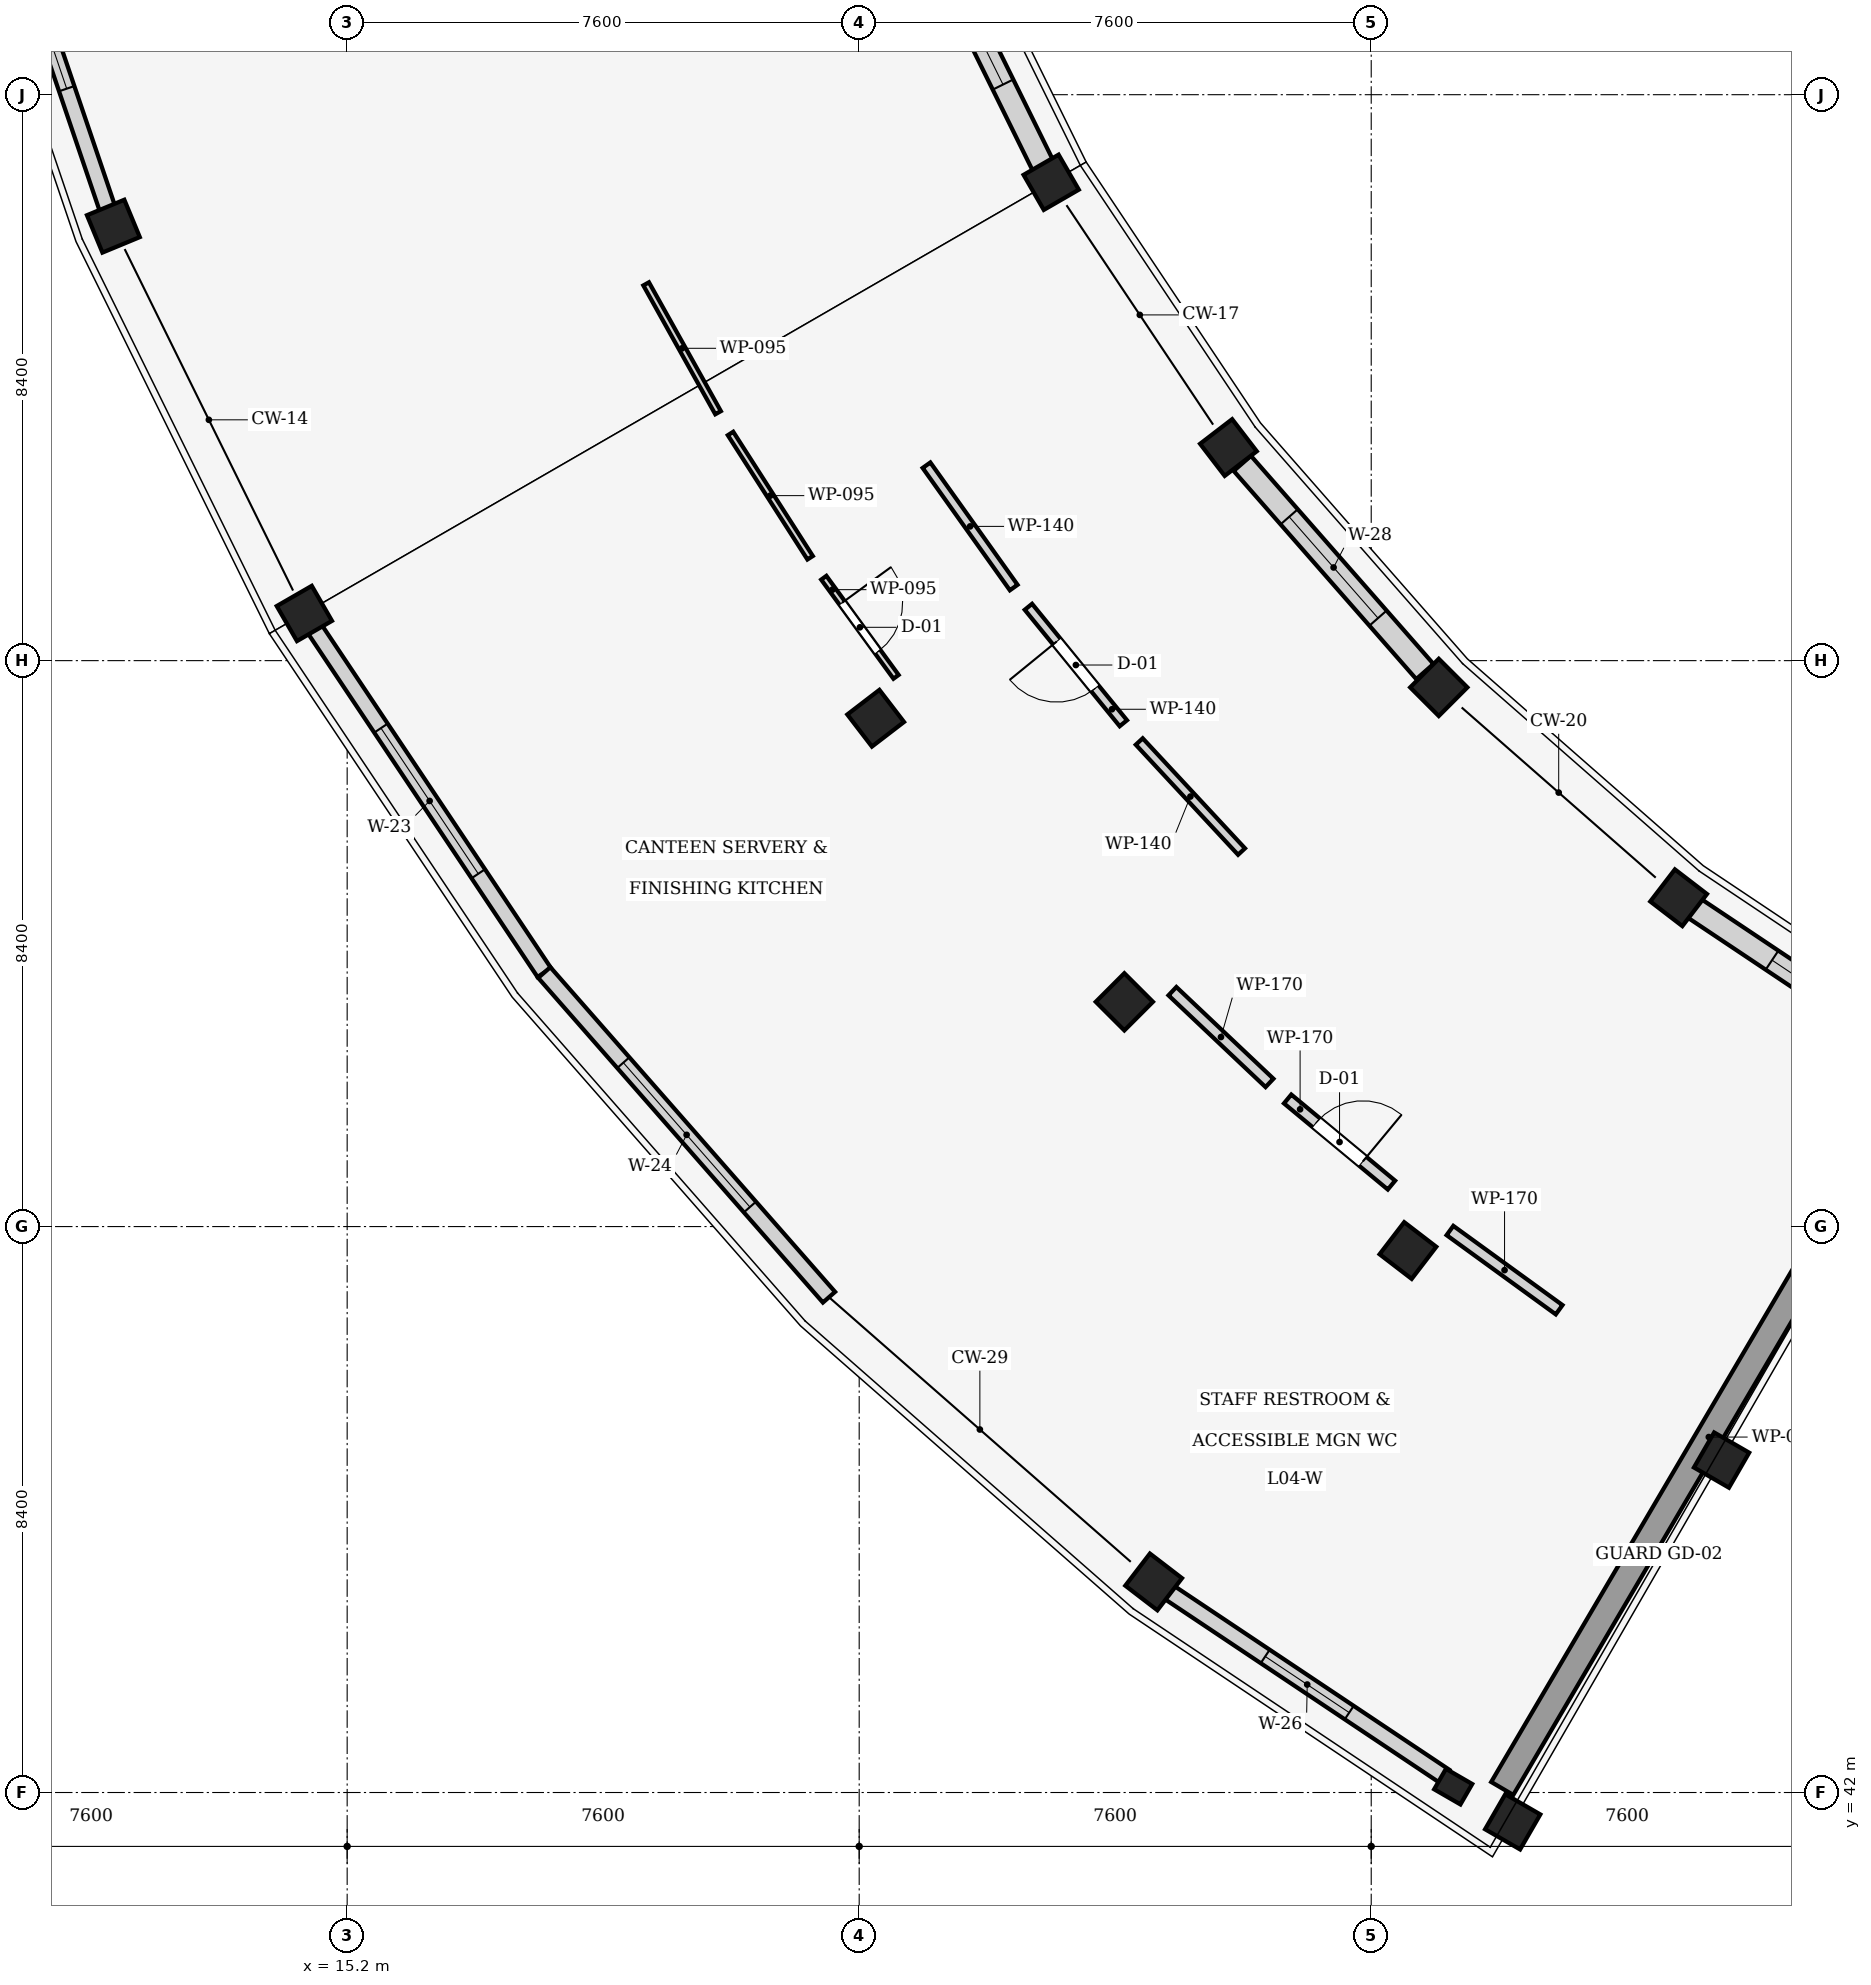
"""IFC4 building model, lengths in metres.
Left out: names, types, materials, properties, quantities, classifications, styles, units other than length and angle.
Written with IfcOpenShell. Run it as: python <this file> out.ifc"""

import sys

from ifc_helpers import new_model, si_unit, direction, frame, frame_2d, origin, origin_2d, place, context, subcontext, project, spatial, rectangle, extrude, element, fill, save


model = new_model("IFC4")
c1 = context("Model", 3, precision=1e-05, world=origin(), true_north=direction((0.0, 1.0)))
c2 = subcontext(c1, "Body", "Model", "MODEL_VIEW")
j1 = project(units=[si_unit("LENGTHUNIT", "METRE"), si_unit("PLANEANGLEUNIT", "RADIAN")], contexts=[c1])
p1 = place(None, origin())
s1 = spatial("IfcSite", under=j1, at=p1, CompositionType="ELEMENT")
p2 = place(p1, origin())
s2 = spatial("IfcBuilding", under=s1, at=p2, CompositionType="ELEMENT")
p3 = place(p2, frame((0.0, 0.0, 17.25)))
s3 = spatial("IfcBuildingStorey", under=s2, at=p3, CompositionType="ELEMENT", Elevation=17.25)
for number, where, z_axis, x_axis in (
    (1, (11.73, 65.249, 0.0), (0.0, 0.0, 1.0), (-0.924, -0.383, 0.0)),
    (2, (25.65, 65.9, 0.0), (0.0, 0.0, 1.0), (-0.866, -0.5, 0.0)),
    (3, (14.565, 59.5, 0.0), (0.0, 0.0, 1.0), (-0.866, -0.5, 0.0)),
    (4, (28.281, 61.963, 0.0), (0.0, 0.0, 1.0), (-0.793, -0.609, 0.0)),
    (5, (23.044, 57.945, 0.0), (0.0, 0.0, 1.0), (-0.793, -0.609, 0.0)),
    (6, (31.403, 58.403, 0.0), (0.0, 0.0, 1.0), (-0.707, -0.707, 0.0)),
    (7, (26.736, 53.736, 0.0), (0.0, 0.0, 1.0), (-0.707, -0.707, 0.0)),
    (8, (34.963, 55.281, 0.0), (0.0, 0.0, 1.0), (-0.609, -0.793, 0.0)),
    (9, (30.945, 50.044, 0.0), (0.0, 0.0, 1.0), (-0.609, -0.793, 0.0)),
    (10, (27.171, 45.126, 0.0), (0.0, 0.0, 1.0), (-0.609, -0.793, 0.0)),
    (11, (35.6, 46.934, 0.0), (0.0, 0.0, 1.0), (-0.5, -0.866, 0.0)),
    (12, (32.5, 41.565, 0.0), (0.0, 0.0, 1.0), (-0.5, -0.866, 0.0)),
):
    element("IfcColumn", number, at=place(p3, frame(where, z_axis=z_axis, x_axis=x_axis)), inside=s3, PredefinedType="COLUMN", context=c2, shape_type="SweptSolid", body=[
        extrude(rectangle(XDim=0.6, YDim=0.6, at=origin_2d()), origin(), (0.0, 0.0, 1.0), 4.05),
    ])
p4 = place(p3, frame((31.617, 42.087, 0.0), z_axis=(0.0, 0.0, 1.0), x_axis=(-0.5, -0.866025403784, 0.0)))
e13 = element("IfcColumn", 13, at=p4, inside=s3, PredefinedType="PILASTER", context=c2, shape_type="SweptSolid", body=[
    extrude(rectangle(XDim=0.35, YDim=0.45, at=origin_2d()), origin(), (0.0, 0.0, 1.0), 4.05),
])
p5 = place(p3, frame((11.65, 65.483, 0.0), z_axis=(0.0, 0.0, 1.0), x_axis=(-0.321412703871, 0.946939213356, 0.0)))
e14 = element("IfcWall", 14, at=p5, inside=s3, PredefinedType="STANDARD", context=c2, shape_type="SweptSolid", body=[
    extrude(rectangle(XDim=5.913, YDim=0.24, at=frame_2d((2.957, 0.0))), origin(), (0.0, 0.0, 1.0), 3.135),
])
p6 = place(p5, frame((1.907, 0.0, 0.85)))
e15 = element("IfcOpeningElement", 15, at=p6, cuts=e14, PredefinedType="OPENING", context=c2, shape_type="SweptSolid", body=[
    extrude(rectangle(XDim=2.1, YDim=1.65, at=frame_2d((1.05, 0.825))), frame((0.0, 0.13, 0.0), z_axis=(0.0, -1.0, 0.0), x_axis=(1.0, 0.0, 0.0)), (0.0, 0.0, 1.0), 0.26),
])
p7 = place(p3, frame((23.671, 69.912, 0.0), z_axis=(0.0, 0.0, 1.0), x_axis=(0.442290567666, -0.896871815676, 0.0)))
e16 = element("IfcWall", 16, at=p7, inside=s3, PredefinedType="STANDARD", context=c2, shape_type="SweptSolid", body=[
    extrude(rectangle(XDim=4.211, YDim=0.34, at=frame_2d((2.105, 0.0))), origin(), (0.0, 0.0, 1.0), 3.135),
])
p8 = place(p7, frame((1.356, 0.0, 0.85)))
e17 = element("IfcOpeningElement", 17, at=p8, cuts=e16, PredefinedType="OPENING", context=c2, shape_type="SweptSolid", body=[
    extrude(rectangle(XDim=1.5, YDim=1.85, at=frame_2d((0.75, 0.925))), frame((0.0, 0.18, 0.0), z_axis=(0.0, -1.0, 0.0), x_axis=(1.0, 0.0, 0.0)), (0.0, 0.0, 1.0), 0.36),
])
p9 = place(p3, frame((18.126, 54.171, 0.0), z_axis=(0.0, 0.0, 1.0), x_axis=(-0.555591845488, 0.831455170907, 0.0)))
e18 = element("IfcWall", 18, at=p9, inside=s3, PredefinedType="STANDARD", context=c2, shape_type="SweptSolid", body=[
    extrude(rectangle(XDim=6.127, YDim=0.24, at=frame_2d((3.063, 0.0))), origin(), (0.0, 0.0, 1.0), 3.7),
])
p10 = place(p9, frame((1.763, 0.0, 0.85)))
e19 = element("IfcOpeningElement", 19, at=p10, cuts=e18, PredefinedType="OPENING", context=c2, shape_type="SweptSolid", body=[
    extrude(rectangle(XDim=2.6, YDim=1.65, at=frame_2d((1.3, 0.825))), frame((0.0, 0.13, 0.0), z_axis=(0.0, -1.0, 0.0), x_axis=(1.0, 0.0, 0.0)), (0.0, 0.0, 1.0), 0.26),
])
p11 = place(p3, frame((22.352, 49.352, 0.0), z_axis=(0.0, 0.0, 1.0), x_axis=(-0.659350951881, 0.751835302612, 0.0)))
e20 = element("IfcWall", 20, at=p11, inside=s3, PredefinedType="STANDARD", context=c2, shape_type="SweptSolid", body=[
    extrude(rectangle(XDim=6.409, YDim=0.24, at=frame_2d((3.205, 0.0))), origin(), (0.0, 0.0, 1.0), 3.7),
])
p12 = place(p11, frame((1.78, 0.0, 0.85)))
e21 = element("IfcOpeningElement", 21, at=p12, cuts=e20, PredefinedType="OPENING", context=c2, shape_type="SweptSolid", body=[
    extrude(rectangle(XDim=2.85, YDim=1.65, at=frame_2d((1.425, 0.825))), frame((0.0, 0.13, 0.0), z_axis=(0.0, -1.0, 0.0), x_axis=(1.0, 0.0, 0.0)), (0.0, 0.0, 1.0), 0.26),
])
p13 = place(p3, frame((28.487, 61.728, 0.0), z_axis=(0.0, 0.0, 1.0), x_axis=(0.659315893108, -0.751866047308, 0.0)))
e22 = element("IfcWall", 22, at=p13, inside=s3, PredefinedType="STANDARD", context=c2, shape_type="SweptSolid", body=[
    extrude(rectangle(XDim=4.11, YDim=0.34, at=frame_2d((2.055, 0.0))), origin(), (0.0, 0.0, 1.0), 3.135),
])
p14 = place(p13, frame((1.055, 0.0, 0.85)))
e23 = element("IfcOpeningElement", 23, at=p14, cuts=e22, PredefinedType="OPENING", context=c2, shape_type="SweptSolid", body=[
    extrude(rectangle(XDim=2.0, YDim=1.85, at=frame_2d((1.0, 0.925))), frame((0.0, 0.18, 0.0), z_axis=(0.0, -1.0, 0.0), x_axis=(1.0, 0.0, 0.0)), (0.0, 0.0, 1.0), 0.36),
])
p15 = place(p3, frame((31.494, 42.237, 0.0), z_axis=(0.0, 0.0, 1.0), x_axis=(-0.831469224941, 0.555570812747, 0.0)))
e24 = element("IfcWall", 24, at=p15, inside=s3, PredefinedType="STANDARD", context=c2, shape_type="SweptSolid", body=[
    extrude(rectangle(XDim=4.917, YDim=0.24, at=frame_2d((2.458, 0.0))), origin(), (0.0, 0.0, 1.0), 2.985),
])
p16 = place(p15, frame((1.708, 0.0, 0.85)))
e25 = element("IfcOpeningElement", 25, at=p16, cuts=e24, PredefinedType="OPENING", context=c2, shape_type="SweptSolid", body=[
    extrude(rectangle(XDim=1.5, YDim=1.85, at=frame_2d((0.75, 0.925))), frame((0.0, 0.13, 0.0), z_axis=(0.0, -1.0, 0.0), x_axis=(1.0, 0.0, 0.0)), (0.0, 0.0, 1.0), 0.26),
])
p17 = place(p3, frame((35.198, 55.124, 0.0), z_axis=(0.0, 0.0, 1.0), x_axis=(0.831482404849, -0.555551087144, 0.0)))
e26 = element("IfcWall", 26, at=p17, inside=s3, PredefinedType="STANDARD", context=c2, shape_type="SweptSolid", body=[
    extrude(rectangle(XDim=4.17, YDim=0.34, at=frame_2d((2.085, 0.0))), origin(), (0.0, 0.0, 1.0), 2.985),
])
p18 = place(p17, frame((1.385, 0.0, 0.85)))
e27 = element("IfcOpeningElement", 27, at=p18, cuts=e26, PredefinedType="OPENING", context=c2, shape_type="SweptSolid", body=[
    extrude(rectangle(XDim=1.4, YDim=1.65, at=frame_2d((0.7, 0.825))), frame((0.0, 0.18, 0.0), z_axis=(0.0, -1.0, 0.0), x_axis=(1.0, 0.0, 0.0)), (0.0, 0.0, 1.0), 0.36),
])
p19 = place(p3, frame((38.477, 52.491, 0.0), z_axis=(0.0, 0.0, 1.0), x_axis=(-0.506804958987, -0.862060748177, 0.0)))
e28 = element("IfcWall", 28, at=p19, inside=s3, PredefinedType="SHEAR", context=c2, shape_type="SweptSolid", body=[
    extrude(rectangle(XDim=12.1, YDim=0.38, at=frame_2d((6.05, 0.0))), origin(), (0.0, 0.0, 1.0), 3.75),
])
p20 = place(p3, frame((22.275, 60.03, 0.0), z_axis=(0.0, 0.0, 1.0), x_axis=(0.589192228634, -0.807992894596, 0.0)))
e29 = element("IfcWall", 29, at=p20, inside=s3, PredefinedType="PARTITIONING", context=c2, shape_type="SweptSolid", body=[
    extrude(rectangle(XDim=1.82, YDim=0.095, at=frame_2d((0.91, 0.0))), origin(), (0.0, 0.0, 1.0), 2.985),
])
p21 = place(p20, frame((0.46, 0.0, 0.0)))
e30 = element("IfcOpeningElement", 30, at=p21, cuts=e29, PredefinedType="OPENING", context=c2, shape_type="SweptSolid", body=[
    extrude(rectangle(XDim=0.9, YDim=2.1, at=frame_2d((0.45, 1.05))), frame((0.0, 0.057, 0.0), z_axis=(0.0, -1.0, 0.0), x_axis=(1.0, 0.0, 0.0)), (0.0, 0.0, 1.0), 0.115),
])
p22 = place(p3, frame((20.89, 62.171, 0.0), z_axis=(0.0, 0.0, 1.0), x_axis=(0.539325717733, -0.842097245092, 0.0)))
e31 = element("IfcWall", 31, at=p22, inside=s3, PredefinedType="PARTITIONING", context=c2, shape_type="SweptSolid", body=[
    extrude(rectangle(XDim=2.19, YDim=0.095, at=frame_2d((1.095, 0.0))), origin(), (0.0, 0.0, 1.0), 3.63),
])
p23 = place(p3, frame((19.638, 64.392, 0.0), z_axis=(0.0, 0.0, 1.0), x_axis=(0.487553960074, -0.873092856469, 0.0)))
e32 = element("IfcWall", 32, at=p23, inside=s3, PredefinedType="PARTITIONING", context=c2, shape_type="SweptSolid", body=[
    extrude(rectangle(XDim=2.19, YDim=0.095, at=frame_2d((1.095, 0.0))), origin(), (0.0, 0.0, 1.0), 3.63),
])
p24 = place(p3, frame((29.159, 52.294, 0.0), z_axis=(0.0, 0.0, 1.0), x_axis=(0.769718499722, -0.638383451528, 0.0)))
e33 = element("IfcWall", 33, at=p24, inside=s3, PredefinedType="PARTITIONING", context=c2, shape_type="SweptSolid", body=[
    extrude(rectangle(XDim=2.002, YDim=0.17, at=frame_2d((1.001, 0.0))), origin(), (0.0, 0.0, 1.0), 3.63),
])
p25 = place(p24, frame((0.551, 0.0, 0.0)))
e34 = element("IfcOpeningElement", 34, at=p25, cuts=e33, PredefinedType="OPENING", context=c2, shape_type="SweptSolid", body=[
    extrude(rectangle(XDim=0.9, YDim=2.1, at=frame_2d((0.45, 1.05))), frame((0.0, 0.095, 0.0), z_axis=(0.0, -1.0, 0.0), x_axis=(1.0, 0.0, 0.0)), (0.0, 0.0, 1.0), 0.19),
])
p26 = place(p3, frame((31.569, 50.342, 0.0), z_axis=(0.0, 0.0, 1.0), x_axis=(0.809368427119, -0.587301242279, 0.0)))
e35 = element("IfcWall", 35, at=p26, inside=s3, PredefinedType="PARTITIONING", context=c2, shape_type="SweptSolid", body=[
    extrude(rectangle(XDim=2.002, YDim=0.17, at=frame_2d((1.001, 0.0))), origin(), (0.0, 0.0, 1.0), 2.985),
])
p27 = place(p3, frame((27.45, 53.894, 0.0), z_axis=(0.0, 0.0, 1.0), x_axis=(0.726719319968, -0.686934516519, 0.0)))
e36 = element("IfcWall", 36, at=p27, inside=s3, PredefinedType="PARTITIONING", context=c2, shape_type="SweptSolid", body=[
    extrude(rectangle(XDim=1.982, YDim=0.17, at=frame_2d((0.991, 0.0))), origin(), (0.0, 0.0, 1.0), 2.985),
])
p28 = place(p3, frame((26.721, 57.871, 0.0), z_axis=(0.0, 0.0, 1.0), x_axis=(-0.631919089096, 0.775034363649, 0.0)))
e37 = element("IfcWall", 37, at=p28, inside=s3, PredefinedType="PARTITIONING", context=c2, shape_type="SweptSolid", body=[
    extrude(rectangle(XDim=2.229, YDim=0.14, at=frame_2d((1.115, 0.0))), origin(), (0.0, 0.0, 1.0), 2.985),
])
p29 = place(p28, frame((0.665, 0.0, 0.0)))
e38 = element("IfcOpeningElement", 38, at=p29, cuts=e37, PredefinedType="OPENING", context=c2, shape_type="SweptSolid", body=[
    extrude(rectangle(XDim=0.9, YDim=2.1, at=frame_2d((0.45, 1.05))), frame((0.0, 0.08, 0.0), z_axis=(0.0, -1.0, 0.0), x_axis=(1.0, 0.0, 0.0)), (0.0, 0.0, 1.0), 0.16),
])
p30 = place(p3, frame((28.475, 55.966, 0.0), z_axis=(0.0, 0.0, 1.0), x_axis=(-0.680795385987, 0.732473646229, 0.0)))
e39 = element("IfcWall", 39, at=p30, inside=s3, PredefinedType="PARTITIONING", context=c2, shape_type="SweptSolid", body=[
    extrude(rectangle(XDim=2.23, YDim=0.14, at=frame_2d((1.115, 0.0))), origin(), (0.0, 0.0, 1.0), 2.985),
])
p31 = place(p3, frame((25.094, 59.885, 0.0), z_axis=(0.0, 0.0, 1.0), x_axis=(-0.580533534735, 0.81423633857, 0.0)))
e40 = element("IfcWall", 40, at=p31, inside=s3, PredefinedType="PARTITIONING", context=c2, shape_type="SweptSolid", body=[
    extrude(rectangle(XDim=2.229, YDim=0.14, at=frame_2d((1.115, 0.0))), origin(), (0.0, 0.0, 1.0), 2.985),
])
p32 = place(p6, origin())
e41 = element("IfcWindow", 41, at=p32, inside=s3, PartitioningType="SINGLE_PANEL", PredefinedType="WINDOW", context=c2, shape_type="SweptSolid", body=[
    extrude(rectangle(XDim=2.1, YDim=1.65, at=frame_2d((1.05, 0.825))), frame((0.0, 0.03, 0.0), z_axis=(0.0, -1.0, 0.0), x_axis=(1.0, 0.0, 0.0)), (0.0, 0.0, 1.0), 0.06),
])
fill(e15, e41)
p33 = place(p8, origin())
e42 = element("IfcWindow", 42, at=p33, inside=s3, PartitioningType="SINGLE_PANEL", PredefinedType="WINDOW", context=c2, shape_type="SweptSolid", body=[
    extrude(rectangle(XDim=1.5, YDim=1.85, at=frame_2d((0.75, 0.925))), frame((0.0, 0.03, 0.0), z_axis=(0.0, -1.0, 0.0), x_axis=(1.0, 0.0, 0.0)), (0.0, 0.0, 1.0), 0.06),
])
fill(e17, e42)
p34 = place(p10, origin())
e43 = element("IfcWindow", 43, at=p34, inside=s3, PartitioningType="SINGLE_PANEL", PredefinedType="WINDOW", context=c2, shape_type="SweptSolid", body=[
    extrude(rectangle(XDim=2.6, YDim=1.65, at=frame_2d((1.3, 0.825))), frame((0.0, 0.03, 0.0), z_axis=(0.0, -1.0, 0.0), x_axis=(1.0, 0.0, 0.0)), (0.0, 0.0, 1.0), 0.06),
])
fill(e19, e43)
p35 = place(p12, origin())
e44 = element("IfcWindow", 44, at=p35, inside=s3, PartitioningType="SINGLE_PANEL", PredefinedType="WINDOW", context=c2, shape_type="SweptSolid", body=[
    extrude(rectangle(XDim=2.85, YDim=1.65, at=frame_2d((1.425, 0.825))), frame((0.0, 0.03, 0.0), z_axis=(0.0, -1.0, 0.0), x_axis=(1.0, 0.0, 0.0)), (0.0, 0.0, 1.0), 0.06),
])
fill(e21, e44)
p36 = place(p14, origin())
e45 = element("IfcWindow", 45, at=p36, inside=s3, PartitioningType="SINGLE_PANEL", PredefinedType="WINDOW", context=c2, shape_type="SweptSolid", body=[
    extrude(rectangle(XDim=2.0, YDim=1.85, at=frame_2d((1.0, 0.925))), frame((0.0, 0.03, 0.0), z_axis=(0.0, -1.0, 0.0), x_axis=(1.0, 0.0, 0.0)), (0.0, 0.0, 1.0), 0.06),
])
fill(e23, e45)
p37 = place(p16, origin())
e46 = element("IfcWindow", 46, at=p37, inside=s3, PartitioningType="SINGLE_PANEL", PredefinedType="WINDOW", context=c2, shape_type="SweptSolid", body=[
    extrude(rectangle(XDim=1.5, YDim=1.85, at=frame_2d((0.75, 0.925))), frame((0.0, 0.03, 0.0), z_axis=(0.0, -1.0, 0.0), x_axis=(1.0, 0.0, 0.0)), (0.0, 0.0, 1.0), 0.06),
])
fill(e25, e46)
p38 = place(p18, origin())
e47 = element("IfcWindow", 47, at=p38, inside=s3, PartitioningType="SINGLE_PANEL", PredefinedType="WINDOW", context=c2, shape_type="SweptSolid", body=[
    extrude(rectangle(XDim=1.4, YDim=1.65, at=frame_2d((0.7, 0.825))), frame((0.0, 0.03, 0.0), z_axis=(0.0, -1.0, 0.0), x_axis=(1.0, 0.0, 0.0)), (0.0, 0.0, 1.0), 0.06),
])
fill(e27, e47)
p39 = place(p21, origin())
e48 = element("IfcDoor", 48, at=p39, inside=s3, OperationType="SINGLE_SWING_LEFT", PredefinedType="DOOR", context=c2, shape_type="SweptSolid", body=[
    extrude(rectangle(XDim=0.9, YDim=2.1, at=frame_2d((0.45, 1.05))), frame((0.0, 0.025, 0.0), z_axis=(0.0, -1.0, 0.0), x_axis=(1.0, 0.0, 0.0)), (0.0, 0.0, 1.0), 0.05),
])
fill(e30, e48)
p40 = place(p25, origin())
e49 = element("IfcDoor", 49, at=p40, inside=s3, OperationType="SINGLE_SWING_RIGHT", PredefinedType="DOOR", context=c2, shape_type="SweptSolid", body=[
    extrude(rectangle(XDim=0.9, YDim=2.1, at=frame_2d((0.45, 1.05))), frame((0.0, 0.025, 0.0), z_axis=(0.0, -1.0, 0.0), x_axis=(1.0, 0.0, 0.0)), (0.0, 0.0, 1.0), 0.05),
])
fill(e34, e49)
p41 = place(p29, origin())
e50 = element("IfcDoor", 50, at=p41, inside=s3, OperationType="SINGLE_SWING_RIGHT", PredefinedType="DOOR", context=c2, shape_type="SweptSolid", body=[
    extrude(rectangle(XDim=0.9, YDim=2.1, at=frame_2d((0.45, 1.05))), frame((0.0, 0.025, 0.0), z_axis=(0.0, -1.0, 0.0), x_axis=(1.0, 0.0, 0.0)), (0.0, 0.0, 1.0), 0.05),
])
fill(e38, e50)
save(model, sys.argv[1])
